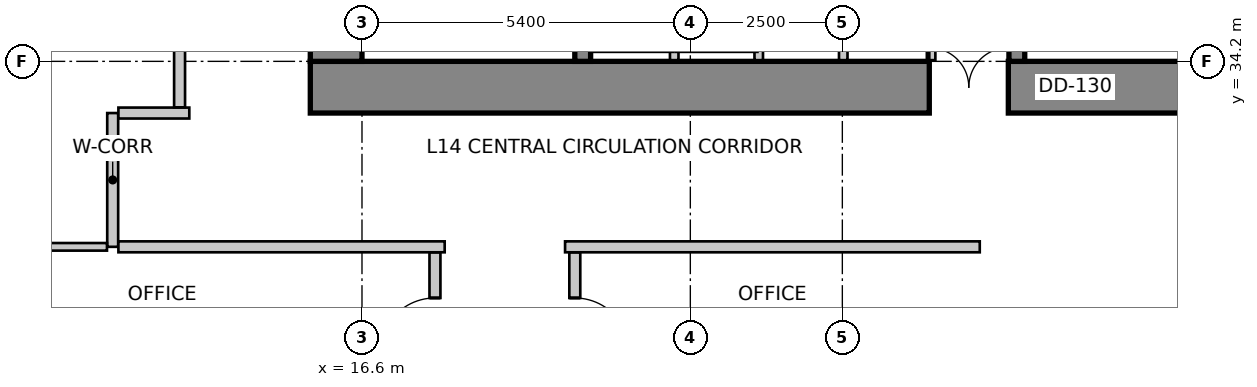
"""IFC4 building model, lengths in metres.
Left out: names, types, materials, properties, quantities, classifications, styles, units other than length and angle.
Written with IfcOpenShell. Run it as: python <this file> out.ifc"""

import sys

from ifc_helpers import new_model, si_unit, direction, frame, frame_2d, origin, place, context, subcontext, project, spatial, rectangle, extrude, source, transform, mapped, element, fill, save


model = new_model("IFC4")
c1 = context("Model", 3, precision=1e-05, world=origin(), true_north=direction((0.0, 1.0)))
c2 = subcontext(c1, "Body", "Model", "MODEL_VIEW")
j1 = project(units=[si_unit("LENGTHUNIT", "METRE"), si_unit("PLANEANGLEUNIT", "RADIAN")], contexts=[c1])
p1 = place(None, origin())
s1 = spatial("IfcSite", under=j1, at=p1, CompositionType="ELEMENT")
p2 = place(p1, origin())
s2 = spatial("IfcBuilding", under=s1, at=p2, CompositionType="ELEMENT")
p3 = place(p2, frame((0.0, 0.0, 59.0)))
s3 = spatial("IfcBuildingStorey", under=s2, at=p3, CompositionType="ELEMENT", Elevation=59.0)
p4 = place(p3, frame((15.75, 33.775, 0.0), z_axis=(0.0, 0.0, 1.0), x_axis=(1.0, 0.0, 0.0)))
e1 = element("IfcWall", 1, at=p4, inside=s3, PredefinedType="SHEAR", context=c2, shape_type="SweptSolid", body=[
    extrude(rectangle(XDim=16.1, YDim=0.85, at=frame_2d((8.05, 0.0))), origin(), (0.0, 0.0, 1.0), 4.0),
])
m1 = source(origin(), c2, "Body", "SweptSolid", [
    extrude(rectangle(XDim=1.3, YDim=2.15, at=frame_2d((0.65, 1.075))), frame((0.0, 0.435, 0.0), z_axis=(0.0, -1.0, 0.0), x_axis=(1.0, 0.0, 0.0)), (0.0, 0.0, 1.0), 0.87),
])
p5 = place(p4, frame((10.18, 0.0, 0.0)))
e2 = element("IfcOpeningElement", 2, at=p5, cuts=e1, PredefinedType="OPENING", context=c2, shape_type="MappedRepresentation", body=[
    mapped(m1, transform((0.0, 0.0, 0.0), scale=1.0)),
])
p6 = place(p3, frame((16.175, 34.2, 0.0), z_axis=(0.0, 0.0, 1.0), x_axis=(0.0, 1.0, 0.0)))
e3 = element("IfcWall", 3, at=p6, inside=s3, PredefinedType="SHEAR", context=c2, shape_type="SweptSolid", body=[
    extrude(rectangle(XDim=11.4, YDim=0.85, at=frame_2d((5.7, 0.0))), origin(), (0.0, 0.0, 1.0), 4.0),
])
m2 = source(origin(), c2, "Body", "SweptSolid", [
    extrude(rectangle(XDim=1.1, YDim=2.15, at=frame_2d((0.55, 1.075))), frame((0.0, 0.435, 0.0), z_axis=(0.0, -1.0, 0.0), x_axis=(1.0, 0.0, 0.0)), (0.0, 0.0, 1.0), 0.87),
])
p7 = place(p6, frame((7.15, 0.0, 0.0)))
e4 = element("IfcOpeningElement", 4, at=p7, cuts=e3, PredefinedType="OPENING", context=c2, shape_type="MappedRepresentation", body=[
    mapped(m2, transform((0.0, 0.0, 0.0), scale=1.0)),
])
p8 = place(p3, frame((20.23, 34.2, 0.0), z_axis=(0.0, 0.0, 1.0), x_axis=(0.0, 1.0, 0.0)))
e5 = element("IfcWall", 5, at=p8, inside=s3, PredefinedType="SHEAR", context=c2, shape_type="SweptSolid", body=[
    extrude(rectangle(XDim=9.06, YDim=0.26, at=frame_2d((4.53, 0.0))), origin(), (0.0, 0.0, 1.0), 4.0),
])
m3 = source(origin(), c2, "Body", "SweptSolid", [
    extrude(rectangle(XDim=1.1, YDim=2.15, at=frame_2d((0.55, 1.075))), frame((0.0, 0.14, 0.0), z_axis=(0.0, -1.0, 0.0), x_axis=(1.0, 0.0, 0.0)), (0.0, 0.0, 1.0), 0.28),
])
p9 = place(p8, frame((7.45, 0.0, 0.0)))
e6 = element("IfcOpeningElement", 6, at=p9, cuts=e5, PredefinedType="OPENING", context=c2, shape_type="MappedRepresentation", body=[
    mapped(m3, transform((0.0, 0.0, 0.0), scale=1.0)),
])
p10 = place(p3, frame((27.37, 34.2, 0.0), z_axis=(0.0, 0.0, 1.0), x_axis=(0.0, 1.0, 0.0)))
e7 = element("IfcWall", 7, at=p10, inside=s3, PredefinedType="SHEAR", context=c2, shape_type="SweptSolid", body=[
    extrude(rectangle(XDim=9.06, YDim=0.26, at=frame_2d((4.53, 0.0))), origin(), (0.0, 0.0, 1.0), 4.0),
])
p11 = place(p10, frame((7.45, 0.0, 0.0)))
e8 = element("IfcOpeningElement", 8, at=p11, cuts=e7, PredefinedType="OPENING", context=c2, shape_type="MappedRepresentation", body=[
    mapped(m3, transform((0.0, 0.0, 0.0), scale=1.0)),
])
p12 = place(p3, frame((13.269, 47.134, 0.0), z_axis=(0.0, 0.0, 1.0), x_axis=(-0.319920423265, -0.947444416722, 0.0)))
e9 = element("IfcWall", 9, at=p12, inside=s3, PredefinedType="SOLIDWALL", context=c2, shape_type="SweptSolid", body=[
    extrude(rectangle(XDim=16.135, YDim=0.3, at=frame_2d((8.067, 0.0))), origin(), (0.0, 0.0, 1.0), 3.7),
])
m4 = source(origin(), c2, "Body", "SweptSolid", [
    extrude(rectangle(XDim=2.8, YDim=2.4, at=frame_2d((1.4, 1.2))), frame((0.0, 0.16, 0.0), z_axis=(0.0, -1.0, 0.0), x_axis=(1.0, 0.0, 0.0)), (0.0, 0.0, 1.0), 0.32),
])
p13 = place(p12, frame((1.988, 0.0, 0.85)))
e10 = element("IfcOpeningElement", 10, at=p13, cuts=e9, PredefinedType="OPENING", context=c2, shape_type="MappedRepresentation", body=[
    mapped(m4, transform((0.0, 0.0, 0.0), scale=1.0)),
])
m5 = source(origin(), c2, "Body", "SweptSolid", [
    extrude(rectangle(XDim=2.4, YDim=2.2, at=frame_2d((1.2, 1.1))), frame((0.0, 0.16, 0.0), z_axis=(0.0, -1.0, 0.0), x_axis=(1.0, 0.0, 0.0)), (0.0, 0.0, 1.0), 0.32),
])
p14 = place(p12, frame((7.159, 0.0, 0.85)))
e11 = element("IfcOpeningElement", 11, at=p14, cuts=e9, PredefinedType="OPENING", context=c2, shape_type="MappedRepresentation", body=[
    mapped(m5, transform((0.0, 0.0, 0.0), scale=1.0)),
])
p15 = place(p12, frame((11.93, 0.0, 0.85)))
e12 = element("IfcOpeningElement", 12, at=p15, cuts=e9, PredefinedType="OPENING", context=c2, shape_type="MappedRepresentation", body=[
    mapped(m4, transform((0.0, 0.0, 0.0), scale=1.0)),
])
p16 = place(p3, frame((8.183, 31.833, 0.0), z_axis=(0.0, 0.0, 1.0), x_axis=(0.18216364648, -0.983268226834, 0.0)))
e13 = element("IfcWall", 13, at=p16, inside=s3, PredefinedType="SOLIDWALL", context=c2, shape_type="SweptSolid", body=[
    extrude(rectangle(XDim=26.678, YDim=0.3, at=frame_2d((13.339, 0.0))), origin(), (0.0, 0.0, 1.0), 3.7),
])
m6 = source(origin(), c2, "Body", "SweptSolid", [
    extrude(rectangle(XDim=1.8, YDim=2.1, at=frame_2d((0.9, 1.05))), frame((0.0, 0.16, 0.0), z_axis=(0.0, -1.0, 0.0), x_axis=(1.0, 0.0, 0.0)), (0.0, 0.0, 1.0), 0.32),
])
p17 = place(p16, frame((1.164, 0.0, 0.85)))
e14 = element("IfcOpeningElement", 14, at=p17, cuts=e13, PredefinedType="OPENING", context=c2, shape_type="MappedRepresentation", body=[
    mapped(m6, transform((0.0, 0.0, 0.0), scale=1.0)),
])
p18 = place(p16, frame((4.5, 0.0, 0.85)))
e15 = element("IfcOpeningElement", 15, at=p18, cuts=e13, PredefinedType="OPENING", context=c2, shape_type="MappedRepresentation", body=[
    mapped(m5, transform((0.0, 0.0, 0.0), scale=1.0)),
])
p19 = place(p16, frame((9.076, 0.0, 0.85)))
e16 = element("IfcOpeningElement", 16, at=p19, cuts=e13, PredefinedType="OPENING", context=c2, shape_type="MappedRepresentation", body=[
    mapped(m5, transform((0.0, 0.0, 0.0), scale=1.0)),
])
p20 = place(p16, frame((13.653, 0.0, 0.85)))
e17 = element("IfcOpeningElement", 17, at=p20, cuts=e13, PredefinedType="OPENING", context=c2, shape_type="MappedRepresentation", body=[
    mapped(m5, transform((0.0, 0.0, 0.0), scale=1.0)),
])
p21 = place(p16, frame((18.411, 0.0, 0.85)))
e18 = element("IfcOpeningElement", 18, at=p21, cuts=e13, PredefinedType="OPENING", context=c2, shape_type="MappedRepresentation", body=[
    mapped(m5, transform((0.0, 0.0, 0.0), scale=1.0)),
])
p22 = place(p16, frame((22.709, 0.0, 0.85)))
e19 = element("IfcOpeningElement", 19, at=p22, cuts=e13, PredefinedType="OPENING", context=c2, shape_type="MappedRepresentation", body=[
    mapped(m4, transform((0.0, 0.0, 0.0), scale=1.0)),
])
for number, where, z_axis, x_axis in (
    (20, (25.96, 34.22, 0.0), (0.0, 0.0, 1.0), (0.0, 1.0, 0.0)),
    (21, (21.735, 34.22, 0.0), (0.0, 0.0, 1.0), (0.0, 1.0, 0.0)),
    (22, (23.125, 34.22, 0.0), (0.0, 0.0, 1.0), (0.0, 1.0, 0.0)),
    (23, (24.515, 34.22, 0.0), (0.0, 0.0, 1.0), (0.0, 1.0, 0.0)),
):
    element("IfcWall", number, at=place(p3, frame(where, z_axis=z_axis, x_axis=x_axis)), inside=s3, PredefinedType="SOLIDWALL", context=c2, shape_type="SweptSolid", body=[
        extrude(rectangle(XDim=1.62, YDim=0.14, at=frame_2d((0.81, 0.0))), origin(), (0.0, 0.0, 1.0), 2.992),
    ])
p23 = place(p3, frame((12.5, 31.15, 0.0), z_axis=(0.0, 0.0, 1.0), x_axis=(0.0, 1.0, 0.0)))
e24 = element("IfcWall", 24, at=p23, inside=s3, PredefinedType="PARTITIONING", context=c2, shape_type="SweptSolid", body=[
    extrude(rectangle(XDim=2.2, YDim=0.18, at=frame_2d((1.1, 0.0))), origin(), (0.0, 0.0, 1.0), 3.384),
])
p24 = place(p3, frame((12.594, 33.35, 0.0), z_axis=(0.0, 0.0, 1.0), x_axis=(1.0, 0.0, 0.0)))
e25 = element("IfcWall", 25, at=p24, inside=s3, PredefinedType="PARTITIONING", context=c2, shape_type="SweptSolid", body=[
    extrude(rectangle(XDim=1.166, YDim=0.18, at=frame_2d((0.583, 0.0))), origin(), (0.0, 0.0, 1.0), 3.7),
])
p25 = place(p3, frame((17.96, 31.15, 0.0), z_axis=(0.0, 0.0, 1.0), x_axis=(-1.0, 0.0, 0.0)))
e26 = element("IfcWall", 26, at=p25, inside=s3, PredefinedType="PARTITIONING", context=c2, shape_type="SweptSolid", body=[
    extrude(rectangle(XDim=5.366, YDim=0.18, at=frame_2d((2.683, 0.0))), origin(), (0.0, 0.0, 1.0), 3.384),
])
p26 = place(p3, frame((26.76, 31.15, 0.0), z_axis=(0.0, 0.0, 1.0), x_axis=(-1.0, 0.0, 0.0)))
e27 = element("IfcWall", 27, at=p26, inside=s3, PredefinedType="PARTITIONING", context=c2, shape_type="SweptSolid", body=[
    extrude(rectangle(XDim=6.82, YDim=0.18, at=frame_2d((3.41, 0.0))), origin(), (0.0, 0.0, 1.0), 3.384),
])
p27 = place(p3, frame((13.6, 33.444, 0.0), z_axis=(0.0, 0.0, 1.0), x_axis=(0.0, 1.0, 0.0)))
e28 = element("IfcWall", 28, at=p27, inside=s3, PredefinedType="PARTITIONING", context=c2, shape_type="SweptSolid", body=[
    extrude(rectangle(XDim=13.896, YDim=0.18, at=frame_2d((6.948, 0.0))), origin(), (0.0, 0.0, 1.0), 2.842),
])
m7 = source(origin(), c2, "Body", "SweptSolid", [
    extrude(rectangle(XDim=0.9, YDim=2.15, at=frame_2d((0.45, 1.075))), frame((0.0, 0.1, 0.0), z_axis=(0.0, -1.0, 0.0), x_axis=(1.0, 0.0, 0.0)), (0.0, 0.0, 1.0), 0.2),
])
p28 = place(p27, frame((4.144, 0.0, 0.0)))
e29 = element("IfcOpeningElement", 29, at=p28, cuts=e28, PredefinedType="OPENING", context=c2, shape_type="MappedRepresentation", body=[
    mapped(m7, transform((0.0, 0.0, 0.0), scale=1.0)),
])
p29 = place(p3, frame((12.406, 31.15, 0.0), z_axis=(0.0, 0.0, 1.0), x_axis=(-1.0, 0.0, 0.0)))
e30 = element("IfcWall", 30, at=p29, inside=s3, PredefinedType="PARTITIONING", context=c2, shape_type="SweptSolid", body=[
    extrude(rectangle(XDim=3.979, YDim=0.125, at=frame_2d((1.99, 0.0))), origin(), (0.0, 0.0, 1.0), 2.842),
])
p30 = place(p3, frame((17.8, 28.662, 0.0), z_axis=(0.0, 0.0, 1.0), x_axis=(0.0, 1.0, 0.0)))
e31 = element("IfcWall", 31, at=p30, inside=s3, PredefinedType="PARTITIONING", context=c2, shape_type="SweptSolid", body=[
    extrude(rectangle(XDim=2.394, YDim=0.18, at=frame_2d((1.197, 0.0))), origin(), (0.0, 0.0, 1.0), 3.384),
])
p31 = place(p30, frame((0.747, 0.0, 0.0)))
e32 = element("IfcOpeningElement", 32, at=p31, cuts=e31, PredefinedType="OPENING", context=c2, shape_type="MappedRepresentation", body=[
    mapped(m7, transform((0.0, 0.0, 0.0), scale=1.0)),
])
p32 = place(p3, frame((20.1, 31.056, 0.0), z_axis=(0.0, 0.0, 1.0), x_axis=(0.0, -1.0, 0.0)))
e33 = element("IfcWall", 33, at=p32, inside=s3, PredefinedType="PARTITIONING", context=c2, shape_type="SweptSolid", body=[
    extrude(rectangle(XDim=2.394, YDim=0.18, at=frame_2d((1.197, 0.0))), origin(), (0.0, 0.0, 1.0), 3.384),
])
p33 = place(p32, frame((0.747, 0.0, 0.0)))
e34 = element("IfcOpeningElement", 34, at=p33, cuts=e33, PredefinedType="OPENING", context=c2, shape_type="MappedRepresentation", body=[
    mapped(m7, transform((0.0, 0.0, 0.0), scale=1.0)),
])
m8 = source(origin(), c2, "Body", "SweptSolid", [
    extrude(rectangle(XDim=1.3, YDim=2.15, at=frame_2d((0.65, 1.075))), frame((0.0, 0.025, 0.0), z_axis=(0.0, -1.0, 0.0), x_axis=(1.0, 0.0, 0.0)), (0.0, 0.0, 1.0), 0.05),
])
p34 = place(p5, origin())
e35 = element("IfcDoor", 35, at=p34, inside=s3, OperationType="DOUBLE_DOOR_SINGLE_SWING", PredefinedType="DOOR", context=c2, shape_type="MappedRepresentation", body=[
    mapped(m8, transform((0.0, 0.0, 0.0), scale=1.0)),
])
fill(e2, e35)
m9 = source(origin(), c2, "Body", "SweptSolid", [
    extrude(rectangle(XDim=0.9, YDim=2.15, at=frame_2d((0.45, 1.075))), frame((0.0, 0.025, 0.0), z_axis=(0.0, -1.0, 0.0), x_axis=(1.0, 0.0, 0.0)), (0.0, 0.0, 1.0), 0.05),
])
p35 = place(p31, origin())
e36 = element("IfcDoor", 36, at=p35, inside=s3, OperationType="SINGLE_SWING_LEFT", PredefinedType="DOOR", context=c2, shape_type="MappedRepresentation", body=[
    mapped(m9, transform((0.0, 0.0, 0.0), scale=1.0)),
])
fill(e32, e36)
p36 = place(p33, origin())
e37 = element("IfcDoor", 37, at=p36, inside=s3, OperationType="SINGLE_SWING_RIGHT", PredefinedType="DOOR", context=c2, shape_type="MappedRepresentation", body=[
    mapped(m9, transform((0.0, 0.0, 0.0), scale=1.0)),
])
fill(e34, e37)
save(model, sys.argv[1])
